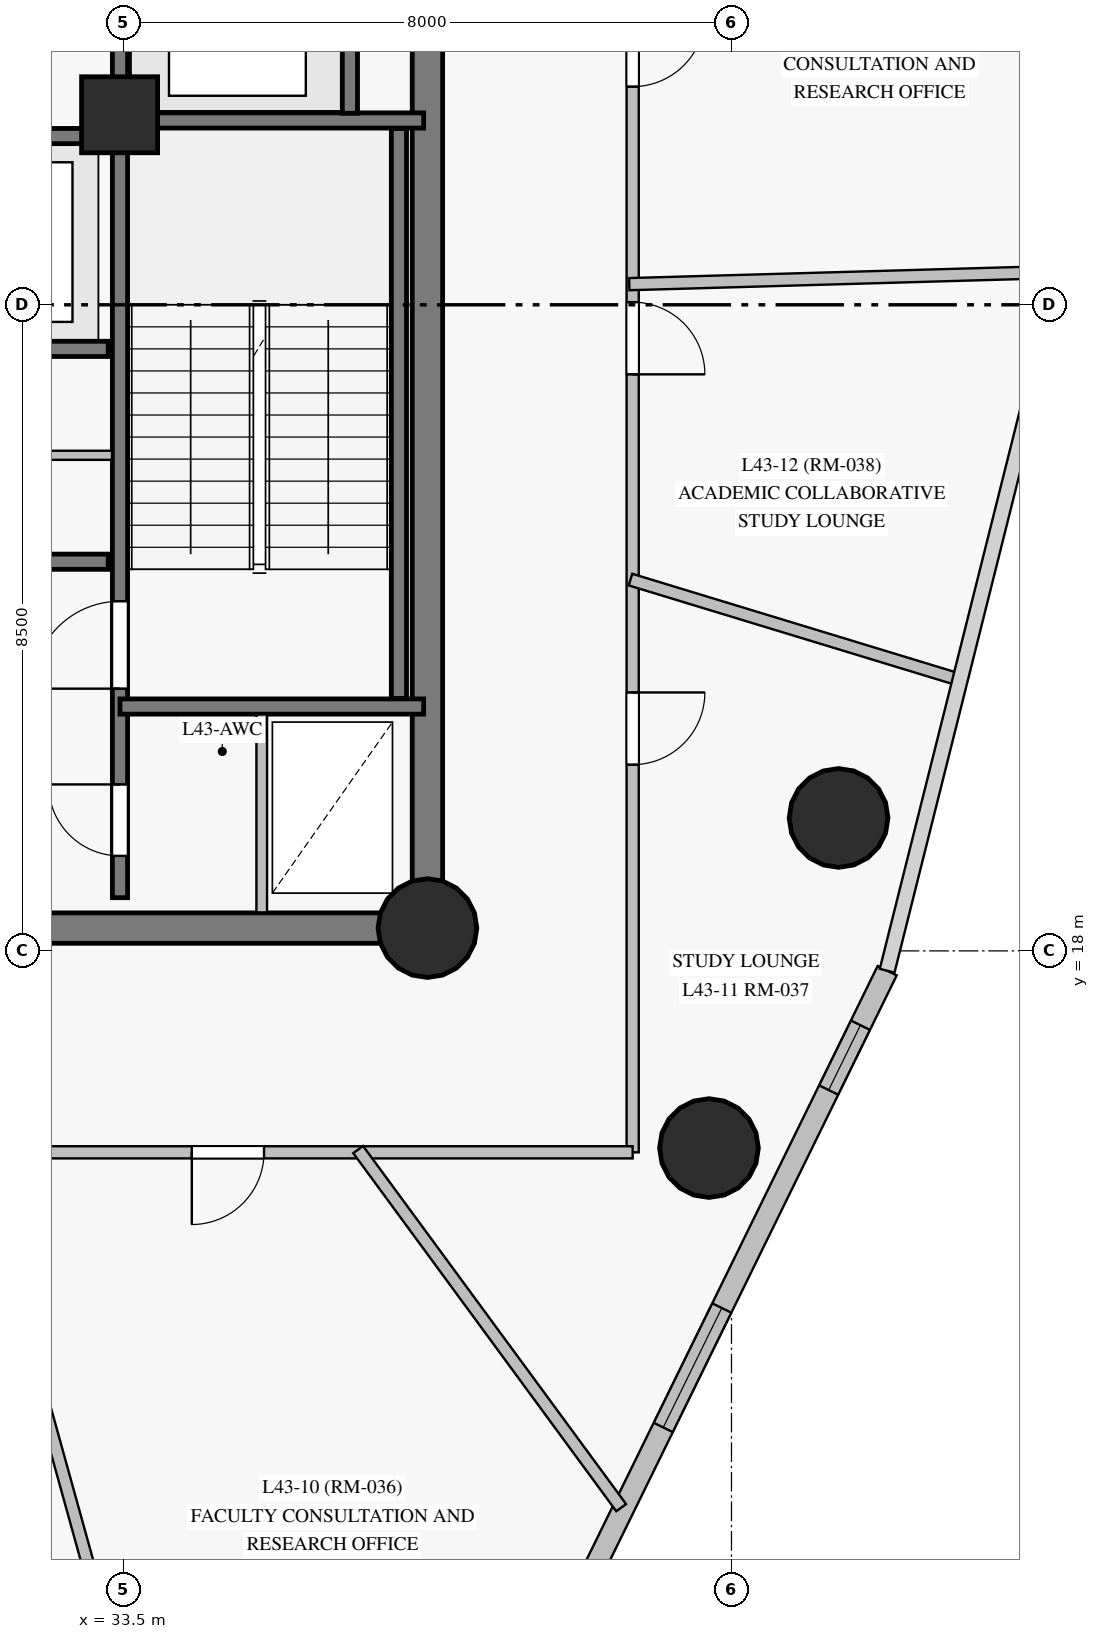
"""IFC4 building model, lengths in metres.
Left out: names, types, materials, properties, quantities, classifications, styles, units other than length and angle.
Written with IfcOpenShell. Run it as: python <this file> out.ifc"""

import sys

from ifc_helpers import new_model, si_unit, direction, frame, frame_2d, origin, origin_with_axes, origin_2d, place, context, subcontext, project, spatial, rectangle, circle, extrude, source, transform, mapped, element, fill, save


model = new_model("IFC4")
c1 = context("Model", 3, precision=1e-05, world=origin(), true_north=direction((0.0, 1.0)))
c2 = subcontext(c1, "Body", "Model", "MODEL_VIEW")
j1 = project(units=[si_unit("LENGTHUNIT", "METRE"), si_unit("PLANEANGLEUNIT", "RADIAN")], contexts=[c1])
p1 = place(None, origin())
s1 = spatial("IfcSite", under=j1, at=p1, CompositionType="ELEMENT")
p2 = place(p1, origin())
s2 = spatial("IfcBuilding", under=s1, at=p2, CompositionType="ELEMENT")
p3 = place(p2, frame((0.0, 0.0, 152.55)))
s3 = spatial("IfcBuildingStorey", under=s2, at=p3, CompositionType="ELEMENT", Elevation=152.55)
p4 = place(p3, frame((26.55, 18.3, 0.0), z_axis=(0.0, 0.0, 1.0), x_axis=(1.0, 0.0, 0.0)))
e1 = element("IfcWall", 1, at=p4, inside=s3, PredefinedType="SHEAR", context=c2, shape_type="SweptSolid", body=[
    extrude(rectangle(XDim=10.95, YDim=0.4, at=frame_2d((5.475, 0.0))), origin(), (0.0, 0.0, 1.0), 3.775),
])
p5 = place(p4, frame((4.55, 0.0, 0.0)))
e2 = element("IfcOpeningElement", 2, at=p5, cuts=e1, PredefinedType="OPENING", context=c2, shape_type="SweptSolid", body=[
    extrude(rectangle(XDim=1.4, YDim=2.2, at=frame_2d((0.7, 1.1))), frame((0.0, 0.21, 0.0), z_axis=(0.0, -1.0, 0.0), x_axis=(1.0, 0.0, 0.0)), (0.0, 0.0, 1.0), 0.42),
])
p6 = place(p3, frame((37.5, 18.3, 0.0), z_axis=(0.0, 0.0, 1.0), x_axis=(0.0, 1.0, 0.0)))
e3 = element("IfcWall", 3, at=p6, inside=s3, PredefinedType="SHEAR", context=c2, shape_type="SweptSolid", body=[
    extrude(rectangle(XDim=16.4, YDim=0.4, at=frame_2d((8.2, 0.0))), origin(), (0.0, 0.0, 1.0), 3.775),
])
p7 = place(p6, frame((14.15, 0.0, 0.0)))
e4 = element("IfcOpeningElement", 4, at=p7, cuts=e3, PredefinedType="OPENING", context=c2, shape_type="SweptSolid", body=[
    extrude(rectangle(XDim=1.2, YDim=2.15, at=frame_2d((0.6, 1.075))), frame((0.0, 0.21, 0.0), z_axis=(0.0, -1.0, 0.0), x_axis=(1.0, 0.0, 0.0)), (0.0, 0.0, 1.0), 0.42),
])
m1 = source(origin_with_axes(), c2, "Body", "SweptSolid", [
    extrude(circle(Radius=0.65, at=origin_2d()), origin(), (0.0, 0.0, 1.0), 4.0),
])
p8 = place(p3, frame((37.5, 18.3, 0.0), z_axis=(0.0, 0.0, 1.0), x_axis=(1.0, 0.0, 0.0)))
e5 = element("IfcColumn", 5, at=p8, inside=s3, PredefinedType="COLUMN", context=c2, shape_type="MappedRepresentation", body=[
    mapped(m1, transform((0.0, 0.0, 0.0), scale=1.0)),
])
m2 = source(origin_with_axes(), c2, "Body", "SweptSolid", [
    extrude(rectangle(XDim=1.0, YDim=1.0, at=origin_2d()), origin(), (0.0, 0.0, 1.0), 4.0),
])
p9 = place(p3, frame((33.45, 29.0, 0.0), z_axis=(0.0, 0.0, 1.0), x_axis=(1.0, 0.0, 0.0)))
e6 = element("IfcColumn", 6, at=p9, inside=s3, PredefinedType="COLUMN", context=c2, shape_type="MappedRepresentation", body=[
    mapped(m2, transform((0.0, 0.0, 0.0), scale=1.0)),
])
for number, where, z_axis, x_axis in (
    (7, (42.909, 19.749, 0.0), (0.0, 0.0, 1.0), (1.0, 0.0, 0.0)),
    (8, (41.204, 15.406, 0.0), (0.0, 0.0, 1.0), (1.0, 0.0, 0.0)),
):
    element("IfcColumn", number, at=place(p3, frame(where, z_axis=z_axis, x_axis=x_axis)), inside=s3, PredefinedType="COLUMN", context=c2, shape_type="MappedRepresentation", body=[
        mapped(m1, transform((0.0, 0.0, 0.0), scale=1.0)),
    ])
p10 = place(p3, frame((37.42, 5.238, 0.0), z_axis=(0.0, 0.0, 1.0), x_axis=(0.440185493808, 0.897906861005, 0.0)))
e9 = element("IfcWall", 9, at=p10, inside=s3, PredefinedType="SOLIDWALL", context=c2, shape_type="SweptSolid", body=[
    extrude(rectangle(XDim=13.922, YDim=0.28, at=frame_2d((6.961, 0.0))), origin(), (0.0, 0.0, 1.0), 3.775),
])
p11 = place(p10, frame((2.183, 0.0, 0.85)))
e10 = element("IfcOpeningElement", 10, at=p11, cuts=e9, PredefinedType="OPENING", context=c2, shape_type="SweptSolid", body=[
    extrude(rectangle(XDim=1.75, YDim=1.65, at=frame_2d((0.875, 0.825))), frame((0.0, 0.15, 0.0), z_axis=(0.0, -1.0, 0.0), x_axis=(1.0, 0.0, 0.0)), (0.0, 0.0, 1.0), 0.3),
])
p12 = place(p10, frame((7.23, 0.0, 0.85)))
e11 = element("IfcOpeningElement", 11, at=p12, cuts=e9, PredefinedType="OPENING", context=c2, shape_type="SweptSolid", body=[
    extrude(rectangle(XDim=1.75, YDim=1.65, at=frame_2d((0.875, 0.825))), frame((0.0, 0.15, 0.0), z_axis=(0.0, -1.0, 0.0), x_axis=(1.0, 0.0, 0.0)), (0.0, 0.0, 1.0), 0.3),
])
p13 = place(p10, frame((12.174, 0.0, 0.85)))
e12 = element("IfcOpeningElement", 12, at=p13, cuts=e9, PredefinedType="OPENING", context=c2, shape_type="SweptSolid", body=[
    extrude(rectangle(XDim=0.95, YDim=1.5, at=frame_2d((0.475, 0.75))), frame((0.0, 0.15, 0.0), z_axis=(0.0, -1.0, 0.0), x_axis=(1.0, 0.0, 0.0)), (0.0, 0.0, 1.0), 0.3),
])
p14 = place(p3, frame((33.455, 18.7, 0.0), z_axis=(0.0, 0.0, 1.0), x_axis=(0.0, 1.0, 0.0)))
e13 = element("IfcWall", 13, at=p14, inside=s3, PredefinedType="SHEAR", context=c2, shape_type="SweptSolid", body=[
    extrude(rectangle(XDim=15.6, YDim=0.2, at=frame_2d((7.8, 0.0))), origin(), (0.0, 0.0, 1.0), 3.775),
])
p15 = place(p14, frame((2.75, 0.0, 0.0)))
e14 = element("IfcOpeningElement", 14, at=p15, cuts=e13, PredefinedType="OPENING", context=c2, shape_type="SweptSolid", body=[
    extrude(rectangle(XDim=1.15, YDim=2.15, at=frame_2d((0.575, 1.075))), frame((0.0, 0.11, 0.0), z_axis=(0.0, -1.0, 0.0), x_axis=(1.0, 0.0, 0.0)), (0.0, 0.0, 1.0), 0.22),
])
p16 = place(p14, frame((0.55, 0.0, 0.0)))
e15 = element("IfcOpeningElement", 15, at=p16, cuts=e13, PredefinedType="OPENING", context=c2, shape_type="SweptSolid", body=[
    extrude(rectangle(XDim=0.94, YDim=2.1, at=frame_2d((0.47, 1.05))), frame((0.0, 0.11, 0.0), z_axis=(0.0, -1.0, 0.0), x_axis=(1.0, 0.0, 0.0)), (0.0, 0.0, 1.0), 0.22),
])
p17 = place(p3, frame((23.7, 23.12, 0.0), z_axis=(0.0, 0.0, 1.0), x_axis=(1.0, 0.0, 0.0)))
e16 = element("IfcWall", 16, at=p17, inside=s3, PredefinedType="SHEAR", context=c2, shape_type="SweptSolid", body=[
    extrude(rectangle(XDim=9.6, YDim=0.2, at=frame_2d((4.8, 0.0))), origin(), (0.0, 0.0, 1.0), 3.775),
])
p18 = place(p17, frame((2.4, 0.0, 0.0)))
e17 = element("IfcOpeningElement", 17, at=p18, cuts=e16, PredefinedType="OPENING", context=c2, shape_type="SweptSolid", body=[
    extrude(rectangle(XDim=1.0, YDim=2.15, at=frame_2d((0.5, 1.075))), frame((0.0, 0.11, 0.0), z_axis=(0.0, -1.0, 0.0), x_axis=(1.0, 0.0, 0.0)), (0.0, 0.0, 1.0), 0.22),
])
p19 = place(p3, frame((23.7, 25.92, 0.0), z_axis=(0.0, 0.0, 1.0), x_axis=(1.0, 0.0, 0.0)))
e18 = element("IfcWall", 18, at=p19, inside=s3, PredefinedType="SHEAR", context=c2, shape_type="SweptSolid", body=[
    extrude(rectangle(XDim=9.6, YDim=0.2, at=frame_2d((4.8, 0.0))), origin(), (0.0, 0.0, 1.0), 3.775),
])
p20 = place(p3, frame((23.7, 28.72, 0.0), z_axis=(0.0, 0.0, 1.0), x_axis=(1.0, 0.0, 0.0)))
e19 = element("IfcWall", 19, at=p20, inside=s3, PredefinedType="SHEAR", context=c2, shape_type="SweptSolid", body=[
    extrude(rectangle(XDim=9.6, YDim=0.2, at=frame_2d((4.8, 0.0))), origin(), (0.0, 0.0, 1.0), 3.775),
])
p21 = place(p20, frame((0.6, 0.0, 0.0)))
e20 = element("IfcOpeningElement", 20, at=p21, cuts=e19, PredefinedType="OPENING", context=c2, shape_type="SweptSolid", body=[
    extrude(rectangle(XDim=1.1, YDim=2.15, at=frame_2d((0.55, 1.075))), frame((0.0, 0.11, 0.0), z_axis=(0.0, -1.0, 0.0), x_axis=(1.0, 0.0, 0.0)), (0.0, 0.0, 1.0), 0.22),
])
p22 = place(p20, frame((2.98, 0.0, 0.0)))
e21 = element("IfcOpeningElement", 21, at=p22, cuts=e19, PredefinedType="OPENING", context=c2, shape_type="SweptSolid", body=[
    extrude(rectangle(XDim=1.1, YDim=2.15, at=frame_2d((0.55, 1.075))), frame((0.0, 0.11, 0.0), z_axis=(0.0, -1.0, 0.0), x_axis=(1.0, 0.0, 0.0)), (0.0, 0.0, 1.0), 0.22),
])
p23 = place(p20, frame((5.36, 0.0, 0.0)))
e22 = element("IfcOpeningElement", 22, at=p23, cuts=e19, PredefinedType="OPENING", context=c2, shape_type="SweptSolid", body=[
    extrude(rectangle(XDim=1.1, YDim=2.15, at=frame_2d((0.55, 1.075))), frame((0.0, 0.11, 0.0), z_axis=(0.0, -1.0, 0.0), x_axis=(1.0, 0.0, 0.0)), (0.0, 0.0, 1.0), 0.22),
])
p24 = place(p20, frame((7.74, 0.0, 0.0)))
e23 = element("IfcOpeningElement", 23, at=p24, cuts=e19, PredefinedType="OPENING", context=c2, shape_type="SweptSolid", body=[
    extrude(rectangle(XDim=1.1, YDim=2.15, at=frame_2d((0.55, 1.075))), frame((0.0, 0.11, 0.0), z_axis=(0.0, -1.0, 0.0), x_axis=(1.0, 0.0, 0.0)), (0.0, 0.0, 1.0), 0.22),
])
p25 = place(p3, frame((37.125, 21.32, 0.0), z_axis=(0.0, 0.0, 1.0), x_axis=(0.0, 1.0, 0.0)))
e24 = element("IfcWall", 24, at=p25, inside=s3, PredefinedType="SHEAR", context=c2, shape_type="SweptSolid", body=[
    extrude(rectangle(XDim=7.5, YDim=0.2, at=frame_2d((3.75, 0.0))), origin(), (0.0, 0.0, 1.0), 3.775),
])
for number, where, z_axis, x_axis in (
    (25, (33.455, 21.215, 0.0), (0.0, 0.0, 1.0), (1.0, 0.0, 0.0)),
    (26, (33.455, 28.925, 0.0), (0.0, 0.0, 1.0), (1.0, 0.0, 0.0)),
):
    element("IfcWall", number, at=place(p3, frame(where, z_axis=z_axis, x_axis=x_axis)), inside=s3, PredefinedType="SHEAR", context=c2, shape_type="SweptSolid", body=[
        extrude(rectangle(XDim=3.995, YDim=0.2, at=frame_2d((1.998, 0.0))), origin(), (0.0, 0.0, 1.0), 3.775),
    ])
p26 = place(p3, frame((36.48, 29.02, 0.0), z_axis=(0.0, 0.0, 1.0), x_axis=(0.0, 1.0, 0.0)))
e27 = element("IfcWall", 27, at=p26, inside=s3, PredefinedType="SHEAR", context=c2, shape_type="SweptSolid", body=[
    extrude(rectangle(XDim=2.86, YDim=0.2, at=frame_2d((1.43, 0.0))), origin(), (0.0, 0.0, 1.0), 3.775),
])
p27 = place(p3, frame((40.2, 37.65, 0.0), z_axis=(0.0, 0.0, 1.0), x_axis=(0.0, -1.0, 0.0)))
e28 = element("IfcWall", 28, at=p27, inside=s3, PredefinedType="PARTITIONING", context=c2, shape_type="SweptSolid", body=[
    extrude(rectangle(XDim=22.3, YDim=0.16, at=frame_2d((11.15, 0.0))), origin(), (0.0, 0.0, 1.0), 3.325),
])
p28 = place(p27, frame((16.25, 0.0, 0.0)))
e29 = element("IfcOpeningElement", 29, at=p28, cuts=e28, PredefinedType="OPENING", context=c2, shape_type="SweptSolid", body=[
    extrude(rectangle(XDim=0.95, YDim=2.15, at=frame_2d((0.475, 1.075))), frame((0.0, 0.09, 0.0), z_axis=(0.0, -1.0, 0.0), x_axis=(1.0, 0.0, 0.0)), (0.0, 0.0, 1.0), 0.18),
])
p29 = place(p27, frame((11.115, 0.0, 0.0)))
e30 = element("IfcOpeningElement", 30, at=p29, cuts=e28, PredefinedType="OPENING", context=c2, shape_type="SweptSolid", body=[
    extrude(rectangle(XDim=0.95, YDim=2.15, at=frame_2d((0.475, 1.075))), frame((0.0, 0.09, 0.0), z_axis=(0.0, -1.0, 0.0), x_axis=(1.0, 0.0, 0.0)), (0.0, 0.0, 1.0), 0.18),
])
p30 = place(p27, frame((7.33, 0.0, 0.0)))
e31 = element("IfcOpeningElement", 31, at=p30, cuts=e28, PredefinedType="OPENING", context=c2, shape_type="SweptSolid", body=[
    extrude(rectangle(XDim=0.95, YDim=2.15, at=frame_2d((0.475, 1.075))), frame((0.0, 0.09, 0.0), z_axis=(0.0, -1.0, 0.0), x_axis=(1.0, 0.0, 0.0)), (0.0, 0.0, 1.0), 0.18),
])
p31 = place(p27, frame((5.01, 0.0, 0.0)))
e32 = element("IfcOpeningElement", 32, at=p31, cuts=e28, PredefinedType="OPENING", context=c2, shape_type="SweptSolid", body=[
    extrude(rectangle(XDim=0.95, YDim=2.15, at=frame_2d((0.475, 1.075))), frame((0.0, 0.09, 0.0), z_axis=(0.0, -1.0, 0.0), x_axis=(1.0, 0.0, 0.0)), (0.0, 0.0, 1.0), 0.18),
])
p32 = place(p3, frame((31.523, 15.379, 0.0), z_axis=(0.0, 0.0, 1.0), x_axis=(0.267345748254, -0.963600669827, 0.0)))
e33 = element("IfcWall", 33, at=p32, inside=s3, PredefinedType="PARTITIONING", context=c2, shape_type="SweptSolid", body=[
    extrude(rectangle(XDim=11.616, YDim=0.16, at=frame_2d((5.808, 0.0))), origin(), (0.0, 0.0, 1.0), 3.775),
])
p33 = place(p3, frame((40.2, 15.35, 0.0), z_axis=(0.0, 0.0, 1.0), x_axis=(-1.0, 0.0, 0.0)))
e34 = element("IfcWall", 34, at=p33, inside=s3, PredefinedType="PARTITIONING", context=c2, shape_type="SweptSolid", body=[
    extrude(rectangle(XDim=10.65, YDim=0.16, at=frame_2d((5.325, 0.0))), origin(), (0.0, 0.0, 1.0), 2.975),
])
p34 = place(p33, frame((9.047, 0.0, 0.0)))
e35 = element("IfcOpeningElement", 35, at=p34, cuts=e34, PredefinedType="OPENING", context=c2, shape_type="SweptSolid", body=[
    extrude(rectangle(XDim=0.95, YDim=2.15, at=frame_2d((0.475, 1.075))), frame((0.0, 0.09, 0.0), z_axis=(0.0, -1.0, 0.0), x_axis=(1.0, 0.0, 0.0)), (0.0, 0.0, 1.0), 0.18),
])
p35 = place(p33, frame((4.85, 0.0, 0.0)))
e36 = element("IfcOpeningElement", 36, at=p35, cuts=e34, PredefinedType="OPENING", context=c2, shape_type="SweptSolid", body=[
    extrude(rectangle(XDim=0.95, YDim=2.15, at=frame_2d((0.475, 1.075))), frame((0.0, 0.09, 0.0), z_axis=(0.0, -1.0, 0.0), x_axis=(1.0, 0.0, 0.0)), (0.0, 0.0, 1.0), 0.18),
])
p36 = place(p3, frame((23.652, 24.52, 0.0), z_axis=(0.0, 0.0, 1.0), x_axis=(1.0, 0.0, 0.0)))
e37 = element("IfcWall", 37, at=p36, inside=s3, PredefinedType="PARTITIONING", context=c2, shape_type="SweptSolid", body=[
    extrude(rectangle(XDim=9.698, YDim=0.12, at=frame_2d((4.849, 0.0))), origin(), (0.0, 0.0, 1.0), 3.775),
])
p37 = place(p36, frame((4.2, 0.0, 0.0)))
e38 = element("IfcOpeningElement", 38, at=p37, cuts=e37, PredefinedType="OPENING", context=c2, shape_type="SweptSolid", body=[
    extrude(rectangle(XDim=0.94, YDim=2.1, at=frame_2d((0.47, 1.05))), frame((0.0, 0.07, 0.0), z_axis=(0.0, -1.0, 0.0), x_axis=(1.0, 0.0, 0.0)), (0.0, 0.0, 1.0), 0.14),
])
p38 = place(p3, frame((36.589, 15.386, 0.0), z_axis=(0.0, 0.0, 1.0), x_axis=(0.59197733649, -0.805954609815, 0.0)))
e39 = element("IfcWall", 39, at=p38, inside=s3, PredefinedType="PARTITIONING", context=c2, shape_type="SweptSolid", body=[
    extrude(rectangle(XDim=5.845, YDim=0.16, at=frame_2d((2.923, 0.0))), origin(), (0.0, 0.0, 1.0), 3.775),
])
p39 = place(p3, frame((40.155, 26.771, 0.0), z_axis=(0.0, 0.0, 1.0), x_axis=(0.999594119788, 0.028488518482, 0.0)))
e40 = element("IfcWall", 40, at=p39, inside=s3, PredefinedType="PARTITIONING", context=c2, shape_type="SweptSolid", body=[
    extrude(rectangle(XDim=5.673, YDim=0.16, at=frame_2d((2.836, 0.0))), origin(), (0.0, 0.0, 1.0), 3.775),
])
p40 = place(p3, frame((40.171, 22.885, 0.0), z_axis=(0.0, 0.0, 1.0), x_axis=(0.956654200198, -0.291226271554, 0.0)))
e41 = element("IfcWall", 41, at=p40, inside=s3, PredefinedType="PARTITIONING", context=c2, shape_type="SweptSolid", body=[
    extrude(rectangle(XDim=4.508, YDim=0.16, at=frame_2d((2.254, 0.0))), origin(), (0.0, 0.0, 1.0), 3.775),
])
p41 = place(p3, frame((35.32, 18.507, 0.0), z_axis=(0.0, 0.0, 1.0), x_axis=(0.0, 1.0, 0.0)))
e42 = element("IfcWall", 42, at=p41, inside=s3, PredefinedType="PARTITIONING", context=c2, shape_type="SweptSolid", body=[
    extrude(rectangle(XDim=2.604, YDim=0.14, at=frame_2d((1.302, 0.0))), origin(), (0.0, 0.0, 1.0), 3.775),
])
m3 = source(origin_with_axes(), c2, "Body", "SweptSolid", [
    extrude(rectangle(XDim=1.75, YDim=1.65, at=frame_2d((0.875, 0.825))), frame((0.0, 0.03, 0.0), z_axis=(0.0, -1.0, 0.0), x_axis=(1.0, 0.0, 0.0)), (0.0, 0.0, 1.0), 0.06),
])
p42 = place(p12, origin())
e43 = element("IfcWindow", 43, at=p42, inside=s3, PartitioningType="SINGLE_PANEL", PredefinedType="WINDOW", context=c2, shape_type="MappedRepresentation", body=[
    mapped(m3, transform((0.0, 0.0, 0.0), scale=1.0)),
])
fill(e11, e43)
m4 = source(origin_with_axes(), c2, "Body", "SweptSolid", [
    extrude(rectangle(XDim=0.95, YDim=1.5, at=frame_2d((0.475, 0.75))), frame((0.0, 0.03, 0.0), z_axis=(0.0, -1.0, 0.0), x_axis=(1.0, 0.0, 0.0)), (0.0, 0.0, 1.0), 0.06),
])
p43 = place(p13, origin())
e44 = element("IfcWindow", 44, at=p43, inside=s3, PartitioningType="SINGLE_PANEL", PredefinedType="WINDOW", context=c2, shape_type="MappedRepresentation", body=[
    mapped(m4, transform((0.0, 0.0, 0.0), scale=1.0)),
])
fill(e12, e44)
m5 = source(origin_with_axes(), c2, "Body", "SweptSolid", [
    extrude(rectangle(XDim=1.15, YDim=2.15, at=frame_2d((0.575, 1.075))), frame((0.0, 0.025, 0.0), z_axis=(0.0, -1.0, 0.0), x_axis=(1.0, 0.0, 0.0)), (0.0, 0.0, 1.0), 0.05),
])
p44 = place(p15, origin())
e45 = element("IfcDoor", 45, at=p44, inside=s3, OperationType="SINGLE_SWING_LEFT", PredefinedType="DOOR", context=c2, shape_type="MappedRepresentation", body=[
    mapped(m5, transform((0.0, 0.0, 0.0), scale=1.0)),
])
fill(e14, e45)
m6 = source(origin_with_axes(), c2, "Body", "SweptSolid", [
    extrude(rectangle(XDim=0.94, YDim=2.1, at=frame_2d((0.47, 1.05))), frame((0.0, 0.025, 0.0), z_axis=(0.0, -1.0, 0.0), x_axis=(1.0, 0.0, 0.0)), (0.0, 0.0, 1.0), 0.05),
])
p45 = place(p16, origin())
e46 = element("IfcDoor", 46, at=p45, inside=s3, OperationType="SINGLE_SWING_RIGHT", PredefinedType="DOOR", context=c2, shape_type="MappedRepresentation", body=[
    mapped(m6, transform((0.0, 0.0, 0.0), scale=1.0)),
])
fill(e15, e46)
m7 = source(origin_with_axes(), c2, "Body", "SweptSolid", [
    extrude(rectangle(XDim=0.95, YDim=2.15, at=frame_2d((0.475, 1.075))), frame((0.0, 0.025, 0.0), z_axis=(0.0, -1.0, 0.0), x_axis=(1.0, 0.0, 0.0)), (0.0, 0.0, 1.0), 0.05),
])
p46 = place(p35, origin())
e47 = element("IfcDoor", 47, at=p46, inside=s3, OperationType="SINGLE_SWING_RIGHT", PredefinedType="DOOR", context=c2, shape_type="MappedRepresentation", body=[
    mapped(m7, transform((0.0, 0.0, 0.0), scale=1.0)),
])
fill(e36, e47)
p47 = place(p28, origin())
e48 = element("IfcDoor", 48, at=p47, inside=s3, OperationType="SINGLE_SWING_LEFT", PredefinedType="DOOR", context=c2, shape_type="MappedRepresentation", body=[
    mapped(m7, transform((0.0, 0.0, 0.0), scale=1.0)),
])
fill(e29, e48)
p48 = place(p29, origin())
e49 = element("IfcDoor", 49, at=p48, inside=s3, OperationType="SINGLE_SWING_RIGHT", PredefinedType="DOOR", context=c2, shape_type="MappedRepresentation", body=[
    mapped(m7, transform((0.0, 0.0, 0.0), scale=1.0)),
])
fill(e30, e49)
p49 = place(p30, origin())
e50 = element("IfcDoor", 50, at=p49, inside=s3, OperationType="SINGLE_SWING_LEFT", PredefinedType="DOOR", context=c2, shape_type="MappedRepresentation", body=[
    mapped(m7, transform((0.0, 0.0, 0.0), scale=1.0)),
])
fill(e31, e50)
save(model, sys.argv[1])
